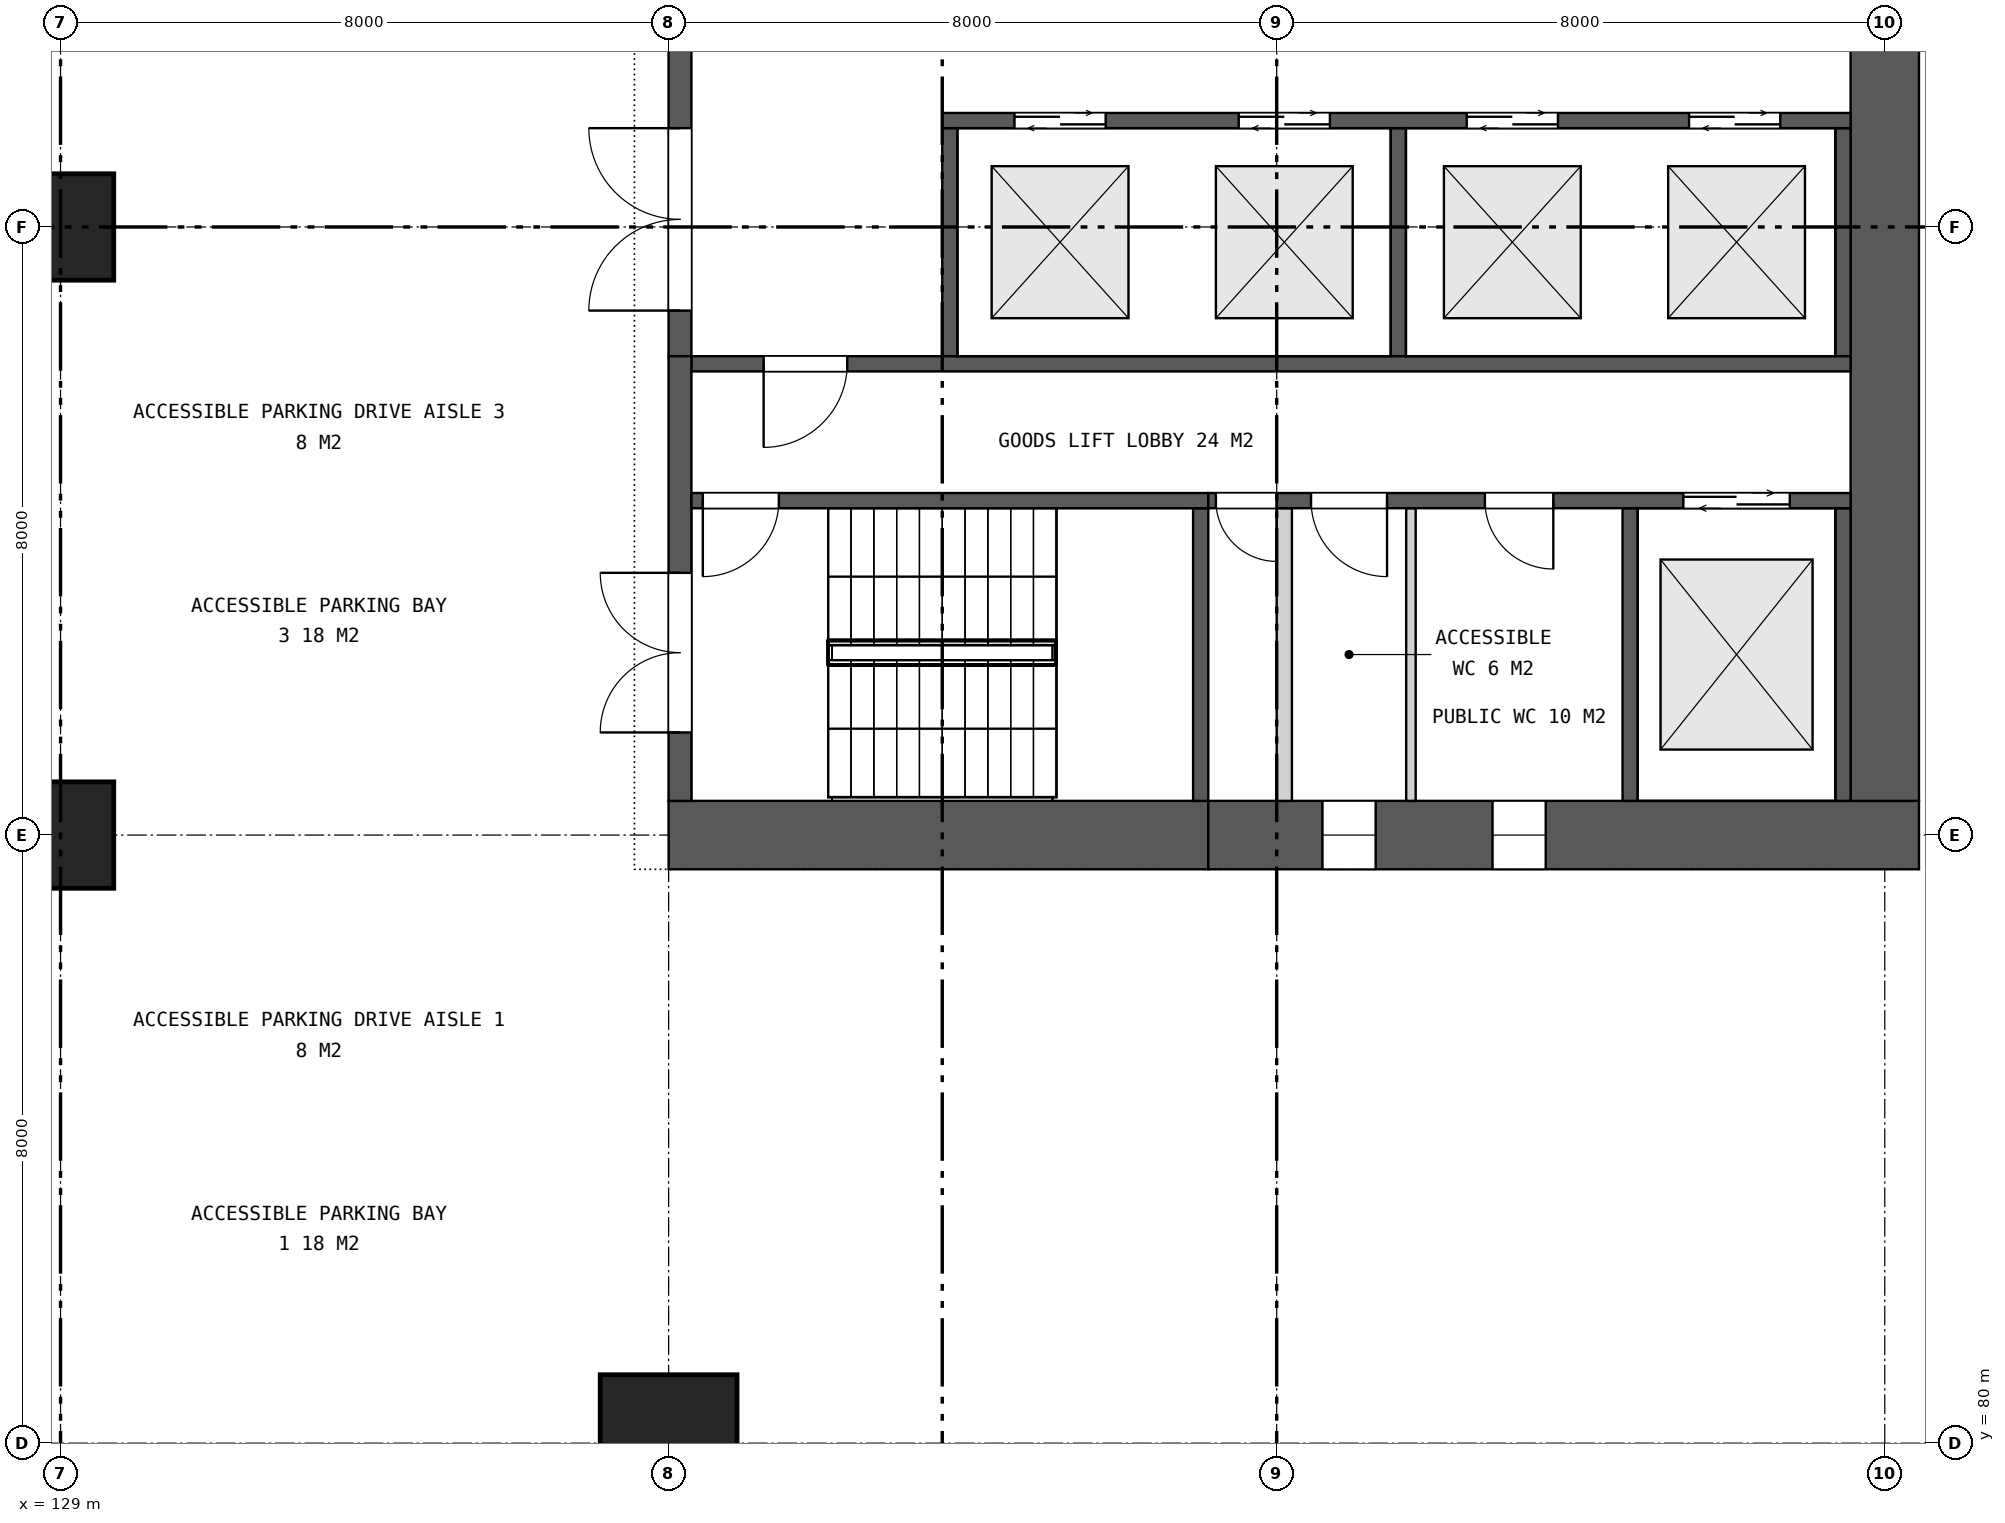
"""IFC4 building model, lengths in metres.
Left out: names, types, materials, properties, quantities, classifications, styles, units other than length and angle.
Written with IfcOpenShell. Run it as: python <this file> out.ifc"""

import sys

from ifc_helpers import new_model, si_unit, direction, frame, frame_2d, origin, origin_2d, place, context, subcontext, project, spatial, rectangle, circle, extrude, element, fill, save


model = new_model("IFC4")
c1 = context("Model", 3, precision=1e-05, world=origin(), true_north=direction((0.0, 1.0)))
c2 = subcontext(c1, "Body", "Model", "MODEL_VIEW")
j1 = project(units=[si_unit("LENGTHUNIT", "METRE"), si_unit("PLANEANGLEUNIT", "RADIAN")], contexts=[c1])
p1 = place(None, origin())
s1 = spatial("IfcSite", under=j1, at=p1, CompositionType="ELEMENT")
p2 = place(p1, origin())
s2 = spatial("IfcBuilding", under=s1, at=p2, CompositionType="ELEMENT")
p3 = place(p2, origin())
s3 = spatial("IfcBuildingStorey", under=s2, at=p3, CompositionType="ELEMENT", Elevation=0.0)
for number, where, z_axis, x_axis in (
    (1, (129.0, 88.0, -0.4), (0.0, 0.0, 1.0), (1.0, 0.0, 0.0)),
    (2, (129.0, 96.0, -0.4), (0.0, 0.0, 1.0), (1.0, 0.0, 0.0)),
):
    element("IfcColumn", number, at=place(p3, frame(where, z_axis=z_axis, x_axis=x_axis)), inside=s3, PredefinedType="COLUMN", context=c2, shape_type="SweptSolid", body=[
        extrude(circle(Radius=0.7, at=origin_2d()), origin(), (0.0, 0.0, 1.0), 10.4),
    ])
p4 = place(p3, frame((137.0, 80.0, -0.4), z_axis=(0.0, 0.0, 1.0), x_axis=(1.0, 0.0, 0.0)))
e3 = element("IfcColumn", 3, at=p4, inside=s3, PredefinedType="COLUMN", context=c2, shape_type="SweptSolid", body=[
    extrude(circle(Radius=0.9, at=origin_2d()), origin(), (0.0, 0.0, 1.0), 10.4),
])
p5 = place(p3, frame((137.0, 88.0, 0.0), z_axis=(0.0, 0.0, 1.0), x_axis=(1.0, 0.0, 0.0)))
e4 = element("IfcWall", 4, at=p5, inside=s3, PredefinedType="SHEAR", context=c2, shape_type="SweptSolid", body=[
    extrude(rectangle(XDim=7.1, YDim=0.9, at=frame_2d((3.55, 0.0))), origin(), (0.0, 0.0, 1.0), 10.0),
])
p6 = place(p3, frame((144.1, 88.0, 0.0), z_axis=(0.0, 0.0, 1.0), x_axis=(1.0, 0.0, 0.0)))
e5 = element("IfcWall", 5, at=p6, inside=s3, PredefinedType="SHEAR", context=c2, shape_type="SweptSolid", body=[
    extrude(rectangle(XDim=9.35, YDim=0.9, at=frame_2d((4.675, 0.0))), origin(), (0.0, 0.0, 1.0), 10.0),
])
p7 = place(p6, frame((1.502, 0.0, 1.5)))
e6 = element("IfcOpeningElement", 6, at=p7, cuts=e5, PredefinedType="OPENING", context=c2, shape_type="SweptSolid", body=[
    extrude(rectangle(XDim=0.7, YDim=0.9, at=frame_2d((0.35, 0.45))), frame((0.0, 0.46, 0.0), z_axis=(0.0, -1.0, 0.0), x_axis=(1.0, 0.0, 0.0)), (0.0, 0.0, 1.0), 0.92),
])
p8 = place(p6, frame((3.739, 0.0, 1.5)))
e7 = element("IfcOpeningElement", 7, at=p8, cuts=e5, PredefinedType="OPENING", context=c2, shape_type="SweptSolid", body=[
    extrude(rectangle(XDim=0.7, YDim=0.9, at=frame_2d((0.35, 0.45))), frame((0.0, 0.46, 0.0), z_axis=(0.0, -1.0, 0.0), x_axis=(1.0, 0.0, 0.0)), (0.0, 0.0, 1.0), 0.92),
])
p9 = place(p3, frame((153.0, 88.45, 0.0), z_axis=(0.0, 0.0, 1.0), x_axis=(0.0, 1.0, 0.0)))
e8 = element("IfcWall", 8, at=p9, inside=s3, PredefinedType="SHEAR", context=c2, shape_type="SweptSolid", body=[
    extrude(rectangle(XDim=23.1, YDim=0.9, at=frame_2d((11.55, 0.0))), origin(), (0.0, 0.0, 1.0), 10.0),
])
p10 = place(p9, frame((10.35, 0.0, 0.0)))
e9 = element("IfcOpeningElement", 9, at=p10, cuts=e8, PredefinedType="OPENING", context=c2, shape_type="SweptSolid", body=[
    extrude(rectangle(XDim=2.4, YDim=2.4, at=frame_2d((1.2, 1.2))), frame((0.0, 0.46, 0.0), z_axis=(0.0, -1.0, 0.0), x_axis=(1.0, 0.0, 0.0)), (0.0, 0.0, 1.0), 0.92),
])
p11 = place(p3, frame((137.15, 94.3, 0.0), z_axis=(0.0, 0.0, 1.0), x_axis=(0.0, 1.0, 0.0)))
e10 = element("IfcWall", 10, at=p11, inside=s3, PredefinedType="SHEAR", context=c2, shape_type="SweptSolid", body=[
    extrude(rectangle(XDim=11.4, YDim=0.3, at=frame_2d((5.7, 0.0))), origin(), (0.0, 0.0, 1.0), 10.0),
])
p12 = place(p11, frame((0.6, 0.0, 0.0)))
e11 = element("IfcOpeningElement", 11, at=p12, cuts=e10, PredefinedType="OPENING", context=c2, shape_type="SweptSolid", body=[
    extrude(rectangle(XDim=2.4, YDim=2.4, at=frame_2d((1.2, 1.2))), frame((0.0, 0.16, 0.0), z_axis=(0.0, -1.0, 0.0), x_axis=(1.0, 0.0, 0.0)), (0.0, 0.0, 1.0), 0.32),
])
p13 = place(p11, frame((4.5, 0.0, 0.0)))
e12 = element("IfcOpeningElement", 12, at=p13, cuts=e10, PredefinedType="OPENING", context=c2, shape_type="SweptSolid", body=[
    extrude(rectangle(XDim=2.4, YDim=2.4, at=frame_2d((1.2, 1.2))), frame((0.0, 0.16, 0.0), z_axis=(0.0, -1.0, 0.0), x_axis=(1.0, 0.0, 0.0)), (0.0, 0.0, 1.0), 0.32),
])
p14 = place(p11, frame((8.4, 0.0, 0.0)))
e13 = element("IfcOpeningElement", 13, at=p14, cuts=e10, PredefinedType="OPENING", context=c2, shape_type="SweptSolid", body=[
    extrude(rectangle(XDim=2.4, YDim=2.4, at=frame_2d((1.2, 1.2))), frame((0.0, 0.16, 0.0), z_axis=(0.0, -1.0, 0.0), x_axis=(1.0, 0.0, 0.0)), (0.0, 0.0, 1.0), 0.32),
])
for number, where, z_axis, x_axis in (
    (14, (140.7, 94.3, 0.0), (0.0, 0.0, 1.0), (0.0, 1.0, 0.0)),
    (15, (146.6, 94.3, 0.0), (0.0, 0.0, 1.0), (0.0, 1.0, 0.0)),
    (16, (152.45, 94.3, 0.0), (0.0, 0.0, 1.0), (0.0, 1.0, 0.0)),
):
    element("IfcWall", number, at=place(p3, frame(where, z_axis=z_axis, x_axis=x_axis)), inside=s3, PredefinedType="SHEAR", context=c2, shape_type="SweptSolid", body=[
        extrude(rectangle(XDim=3.0, YDim=0.2, at=frame_2d((1.5, 0.0))), origin(), (0.0, 0.0, 1.0), 10.0),
    ])
p15 = place(p3, frame((140.6, 97.4, 0.0), z_axis=(0.0, 0.0, 1.0), x_axis=(1.0, 0.0, 0.0)))
e17 = element("IfcWall", 17, at=p15, inside=s3, PredefinedType="SHEAR", context=c2, shape_type="SweptSolid", body=[
    extrude(rectangle(XDim=11.95, YDim=0.2, at=frame_2d((5.975, 0.0))), origin(), (0.0, 0.0, 1.0), 10.0),
])
p16 = place(p15, frame((0.95, 0.0, 0.0)))
e18 = element("IfcOpeningElement", 18, at=p16, cuts=e17, PredefinedType="OPENING", context=c2, shape_type="SweptSolid", body=[
    extrude(rectangle(XDim=1.2, YDim=2.1, at=frame_2d((0.6, 1.05))), frame((0.0, 0.11, 0.0), z_axis=(0.0, -1.0, 0.0), x_axis=(1.0, 0.0, 0.0)), (0.0, 0.0, 1.0), 0.22),
])
p17 = place(p15, frame((3.9, 0.0, 0.0)))
e19 = element("IfcOpeningElement", 19, at=p17, cuts=e17, PredefinedType="OPENING", context=c2, shape_type="SweptSolid", body=[
    extrude(rectangle(XDim=1.2, YDim=2.1, at=frame_2d((0.6, 1.05))), frame((0.0, 0.11, 0.0), z_axis=(0.0, -1.0, 0.0), x_axis=(1.0, 0.0, 0.0)), (0.0, 0.0, 1.0), 0.22),
])
p18 = place(p15, frame((6.9, 0.0, 0.0)))
e20 = element("IfcOpeningElement", 20, at=p18, cuts=e17, PredefinedType="OPENING", context=c2, shape_type="SweptSolid", body=[
    extrude(rectangle(XDim=1.2, YDim=2.1, at=frame_2d((0.6, 1.05))), frame((0.0, 0.11, 0.0), z_axis=(0.0, -1.0, 0.0), x_axis=(1.0, 0.0, 0.0)), (0.0, 0.0, 1.0), 0.22),
])
p19 = place(p15, frame((9.825, 0.0, 0.0)))
e21 = element("IfcOpeningElement", 21, at=p19, cuts=e17, PredefinedType="OPENING", context=c2, shape_type="SweptSolid", body=[
    extrude(rectangle(XDim=1.2, YDim=2.1, at=frame_2d((0.6, 1.05))), frame((0.0, 0.11, 0.0), z_axis=(0.0, -1.0, 0.0), x_axis=(1.0, 0.0, 0.0)), (0.0, 0.0, 1.0), 0.22),
])
p20 = place(p3, frame((137.3, 94.2, 0.0), z_axis=(0.0, 0.0, 1.0), x_axis=(1.0, 0.0, 0.0)))
e22 = element("IfcWall", 22, at=p20, inside=s3, PredefinedType="SHEAR", context=c2, shape_type="SweptSolid", body=[
    extrude(rectangle(XDim=15.25, YDim=0.2, at=frame_2d((7.625, 0.0))), origin(), (0.0, 0.0, 1.0), 10.0),
])
p21 = place(p20, frame((0.95, 0.0, 0.0)))
e23 = element("IfcOpeningElement", 23, at=p21, cuts=e22, PredefinedType="OPENING", context=c2, shape_type="SweptSolid", body=[
    extrude(rectangle(XDim=1.1, YDim=2.1, at=frame_2d((0.55, 1.05))), frame((0.0, 0.11, 0.0), z_axis=(0.0, -1.0, 0.0), x_axis=(1.0, 0.0, 0.0)), (0.0, 0.0, 1.0), 0.22),
])
p22 = place(p3, frame((137.15, 88.45, 0.0), z_axis=(0.0, 0.0, 1.0), x_axis=(0.0, 1.0, 0.0)))
e24 = element("IfcWall", 24, at=p22, inside=s3, PredefinedType="SHEAR", context=c2, shape_type="SweptSolid", body=[
    extrude(rectangle(XDim=5.85, YDim=0.3, at=frame_2d((2.925, 0.0))), origin(), (0.0, 0.0, 1.0), 10.0),
])
p23 = place(p22, frame((0.9, 0.0, 0.0)))
e25 = element("IfcOpeningElement", 25, at=p23, cuts=e24, PredefinedType="OPENING", context=c2, shape_type="SweptSolid", body=[
    extrude(rectangle(XDim=2.1, YDim=2.4, at=frame_2d((1.05, 1.2))), frame((0.0, 0.16, 0.0), z_axis=(0.0, -1.0, 0.0), x_axis=(1.0, 0.0, 0.0)), (0.0, 0.0, 1.0), 0.32),
])
for number, where, z_axis, x_axis in (
    (26, (144.0, 88.45, 0.0), (0.0, 0.0, 1.0), (0.0, 1.0, 0.0)),
    (27, (149.65, 88.45, 0.0), (0.0, 0.0, 1.0), (0.0, 1.0, 0.0)),
    (28, (152.45, 88.45, 0.0), (0.0, 0.0, 1.0), (0.0, 1.0, 0.0)),
):
    element("IfcWall", number, at=place(p3, frame(where, z_axis=z_axis, x_axis=x_axis)), inside=s3, PredefinedType="SHEAR", context=c2, shape_type="SweptSolid", body=[
        extrude(rectangle(XDim=3.85, YDim=0.2, at=frame_2d((1.925, 0.0))), origin(), (0.0, 0.0, 1.0), 10.0),
    ])
p24 = place(p3, frame((145.1, 88.45, 0.0), z_axis=(0.0, 0.0, 1.0), x_axis=(0.0, 1.0, 0.0)))
e29 = element("IfcWall", 29, at=p24, inside=s3, PredefinedType="PARTITIONING", context=c2, shape_type="SweptSolid", body=[
    extrude(rectangle(XDim=3.85, YDim=0.2, at=frame_2d((1.925, 0.0))), origin(), (0.0, 0.0, 1.0), 10.0),
])
p25 = place(p3, frame((146.766, 88.45, 0.0), z_axis=(0.0, 0.0, 1.0), x_axis=(0.0, 1.0, 0.0)))
e30 = element("IfcWall", 30, at=p25, inside=s3, PredefinedType="PARTITIONING", context=c2, shape_type="SweptSolid", body=[
    extrude(rectangle(XDim=3.85, YDim=0.125, at=frame_2d((1.925, 0.0))), origin(), (0.0, 0.0, 1.0), 10.0),
])
p26 = place(p3, frame((137.3, 92.4, 0.0), z_axis=(0.0, 0.0, 1.0), x_axis=(1.0, 0.0, 0.0)))
e31 = element("IfcWall", 31, at=p26, inside=s3, PredefinedType="SHEAR", context=c2, shape_type="SweptSolid", body=[
    extrude(rectangle(XDim=6.8, YDim=0.2, at=frame_2d((3.4, 0.0))), origin(), (0.0, 0.0, 1.0), 10.0),
])
p27 = place(p26, frame((0.15, 0.0, 0.0)))
e32 = element("IfcOpeningElement", 32, at=p27, cuts=e31, PredefinedType="OPENING", context=c2, shape_type="SweptSolid", body=[
    extrude(rectangle(XDim=1.0, YDim=2.1, at=frame_2d((0.5, 1.05))), frame((0.0, 0.11, 0.0), z_axis=(0.0, -1.0, 0.0), x_axis=(1.0, 0.0, 0.0)), (0.0, 0.0, 1.0), 0.22),
])
p28 = place(p3, frame((144.1, 92.4, 0.0), z_axis=(0.0, 0.0, 1.0), x_axis=(1.0, 0.0, 0.0)))
e33 = element("IfcWall", 33, at=p28, inside=s3, PredefinedType="SHEAR", context=c2, shape_type="SweptSolid", body=[
    extrude(rectangle(XDim=8.45, YDim=0.2, at=frame_2d((4.225, 0.0))), origin(), (0.0, 0.0, 1.0), 10.0),
])
p29 = place(p28, frame((0.1, 0.0, 0.0)))
e34 = element("IfcOpeningElement", 34, at=p29, cuts=e33, PredefinedType="OPENING", context=c2, shape_type="SweptSolid", body=[
    extrude(rectangle(XDim=0.8, YDim=2.1, at=frame_2d((0.4, 1.05))), frame((0.0, 0.11, 0.0), z_axis=(0.0, -1.0, 0.0), x_axis=(1.0, 0.0, 0.0)), (0.0, 0.0, 1.0), 0.22),
])
p30 = place(p28, frame((1.352, 0.0, 0.0)))
e35 = element("IfcOpeningElement", 35, at=p30, cuts=e33, PredefinedType="OPENING", context=c2, shape_type="SweptSolid", body=[
    extrude(rectangle(XDim=1.0, YDim=2.1, at=frame_2d((0.5, 1.05))), frame((0.0, 0.11, 0.0), z_axis=(0.0, -1.0, 0.0), x_axis=(1.0, 0.0, 0.0)), (0.0, 0.0, 1.0), 0.22),
])
p31 = place(p28, frame((3.639, 0.0, 0.0)))
e36 = element("IfcOpeningElement", 36, at=p31, cuts=e33, PredefinedType="OPENING", context=c2, shape_type="SweptSolid", body=[
    extrude(rectangle(XDim=0.9, YDim=2.1, at=frame_2d((0.45, 1.05))), frame((0.0, 0.11, 0.0), z_axis=(0.0, -1.0, 0.0), x_axis=(1.0, 0.0, 0.0)), (0.0, 0.0, 1.0), 0.22),
])
p32 = place(p28, frame((6.25, 0.0, 0.0)))
e37 = element("IfcOpeningElement", 37, at=p32, cuts=e33, PredefinedType="OPENING", context=c2, shape_type="SweptSolid", body=[
    extrude(rectangle(XDim=1.4, YDim=2.1, at=frame_2d((0.7, 1.05))), frame((0.0, 0.11, 0.0), z_axis=(0.0, -1.0, 0.0), x_axis=(1.0, 0.0, 0.0)), (0.0, 0.0, 1.0), 0.22),
])
p33 = place(p7, origin())
e38 = element("IfcWindow", 38, at=p33, inside=s3, PartitioningType="SINGLE_PANEL", PredefinedType="WINDOW", context=c2, shape_type="SweptSolid", body=[
    extrude(rectangle(XDim=0.7, YDim=0.9, at=frame_2d((0.35, 0.45))), frame((0.0, 0.03, 0.0), z_axis=(0.0, -1.0, 0.0), x_axis=(1.0, 0.0, 0.0)), (0.0, 0.0, 1.0), 0.06),
])
fill(e6, e38)
p34 = place(p8, origin())
e39 = element("IfcWindow", 39, at=p34, inside=s3, PartitioningType="SINGLE_PANEL", PredefinedType="WINDOW", context=c2, shape_type="SweptSolid", body=[
    extrude(rectangle(XDim=0.7, YDim=0.9, at=frame_2d((0.35, 0.45))), frame((0.0, 0.03, 0.0), z_axis=(0.0, -1.0, 0.0), x_axis=(1.0, 0.0, 0.0)), (0.0, 0.0, 1.0), 0.06),
])
fill(e7, e39)
p35 = place(p12, origin())
e40 = element("IfcDoor", 40, at=p35, inside=s3, OperationType="DOUBLE_DOOR_SINGLE_SWING", PredefinedType="DOOR", context=c2, shape_type="SweptSolid", body=[
    extrude(rectangle(XDim=2.4, YDim=2.4, at=frame_2d((1.2, 1.2))), frame((0.0, 0.025, 0.0), z_axis=(0.0, -1.0, 0.0), x_axis=(1.0, 0.0, 0.0)), (0.0, 0.0, 1.0), 0.05),
])
fill(e11, e40)
p36 = place(p16, origin())
e41 = element("IfcDoor", 41, at=p36, inside=s3, OperationType="DOUBLE_DOOR_SLIDING", PredefinedType="DOOR", context=c2, shape_type="SweptSolid", body=[
    extrude(rectangle(XDim=1.2, YDim=2.1, at=frame_2d((0.6, 1.05))), frame((0.0, 0.025, 0.0), z_axis=(0.0, -1.0, 0.0), x_axis=(1.0, 0.0, 0.0)), (0.0, 0.0, 1.0), 0.05),
])
fill(e18, e41)
p37 = place(p17, origin())
e42 = element("IfcDoor", 42, at=p37, inside=s3, OperationType="DOUBLE_DOOR_SLIDING", PredefinedType="DOOR", context=c2, shape_type="SweptSolid", body=[
    extrude(rectangle(XDim=1.2, YDim=2.1, at=frame_2d((0.6, 1.05))), frame((0.0, 0.025, 0.0), z_axis=(0.0, -1.0, 0.0), x_axis=(1.0, 0.0, 0.0)), (0.0, 0.0, 1.0), 0.05),
])
fill(e19, e42)
p38 = place(p18, origin())
e43 = element("IfcDoor", 43, at=p38, inside=s3, OperationType="DOUBLE_DOOR_SLIDING", PredefinedType="DOOR", context=c2, shape_type="SweptSolid", body=[
    extrude(rectangle(XDim=1.2, YDim=2.1, at=frame_2d((0.6, 1.05))), frame((0.0, 0.025, 0.0), z_axis=(0.0, -1.0, 0.0), x_axis=(1.0, 0.0, 0.0)), (0.0, 0.0, 1.0), 0.05),
])
fill(e20, e43)
p39 = place(p19, origin())
e44 = element("IfcDoor", 44, at=p39, inside=s3, OperationType="DOUBLE_DOOR_SLIDING", PredefinedType="DOOR", context=c2, shape_type="SweptSolid", body=[
    extrude(rectangle(XDim=1.2, YDim=2.1, at=frame_2d((0.6, 1.05))), frame((0.0, 0.025, 0.0), z_axis=(0.0, -1.0, 0.0), x_axis=(1.0, 0.0, 0.0)), (0.0, 0.0, 1.0), 0.05),
])
fill(e21, e44)
p40 = place(p21, frame((1.1, 0.0, 0.0), z_axis=(0.0, 0.0, 1.0), x_axis=(-1.0, 0.0, 0.0)))
e45 = element("IfcDoor", 45, at=p40, inside=s3, OperationType="SINGLE_SWING_RIGHT", PredefinedType="DOOR", context=c2, shape_type="SweptSolid", body=[
    extrude(rectangle(XDim=1.1, YDim=2.1, at=frame_2d((0.55, 1.05))), frame((0.0, 0.025, 0.0), z_axis=(0.0, -1.0, 0.0), x_axis=(1.0, 0.0, 0.0)), (0.0, 0.0, 1.0), 0.05),
])
fill(e23, e45)
p41 = place(p23, origin())
e46 = element("IfcDoor", 46, at=p41, inside=s3, OperationType="DOUBLE_DOOR_SINGLE_SWING", PredefinedType="DOOR", context=c2, shape_type="SweptSolid", body=[
    extrude(rectangle(XDim=2.1, YDim=2.4, at=frame_2d((1.05, 1.2))), frame((0.0, 0.025, 0.0), z_axis=(0.0, -1.0, 0.0), x_axis=(1.0, 0.0, 0.0)), (0.0, 0.0, 1.0), 0.05),
])
fill(e25, e46)
p42 = place(p27, frame((1.0, 0.0, 0.0), z_axis=(0.0, 0.0, 1.0), x_axis=(-1.0, 0.0, 0.0)))
e47 = element("IfcDoor", 47, at=p42, inside=s3, OperationType="SINGLE_SWING_RIGHT", PredefinedType="DOOR", context=c2, shape_type="SweptSolid", body=[
    extrude(rectangle(XDim=1.0, YDim=2.1, at=frame_2d((0.5, 1.05))), frame((0.0, 0.025, 0.0), z_axis=(0.0, -1.0, 0.0), x_axis=(1.0, 0.0, 0.0)), (0.0, 0.0, 1.0), 0.05),
])
fill(e32, e47)
p43 = place(p29, frame((0.8, 0.0, 0.0), z_axis=(0.0, 0.0, 1.0), x_axis=(-1.0, 0.0, 0.0)))
e48 = element("IfcDoor", 48, at=p43, inside=s3, OperationType="SINGLE_SWING_LEFT", PredefinedType="DOOR", context=c2, shape_type="SweptSolid", body=[
    extrude(rectangle(XDim=0.8, YDim=2.1, at=frame_2d((0.4, 1.05))), frame((0.0, 0.025, 0.0), z_axis=(0.0, -1.0, 0.0), x_axis=(1.0, 0.0, 0.0)), (0.0, 0.0, 1.0), 0.05),
])
fill(e34, e48)
p44 = place(p30, frame((1.0, 0.0, 0.0), z_axis=(0.0, 0.0, 1.0), x_axis=(-1.0, 0.0, 0.0)))
e49 = element("IfcDoor", 49, at=p44, inside=s3, OperationType="SINGLE_SWING_LEFT", PredefinedType="DOOR", context=c2, shape_type="SweptSolid", body=[
    extrude(rectangle(XDim=1.0, YDim=2.1, at=frame_2d((0.5, 1.05))), frame((0.0, 0.025, 0.0), z_axis=(0.0, -1.0, 0.0), x_axis=(1.0, 0.0, 0.0)), (0.0, 0.0, 1.0), 0.05),
])
fill(e35, e49)
p45 = place(p31, frame((0.9, 0.0, 0.0), z_axis=(0.0, 0.0, 1.0), x_axis=(-1.0, 0.0, 0.0)))
e50 = element("IfcDoor", 50, at=p45, inside=s3, OperationType="SINGLE_SWING_LEFT", PredefinedType="DOOR", context=c2, shape_type="SweptSolid", body=[
    extrude(rectangle(XDim=0.9, YDim=2.1, at=frame_2d((0.45, 1.05))), frame((0.0, 0.025, 0.0), z_axis=(0.0, -1.0, 0.0), x_axis=(1.0, 0.0, 0.0)), (0.0, 0.0, 1.0), 0.05),
])
fill(e36, e50)
p46 = place(p32, origin())
e51 = element("IfcDoor", 51, at=p46, inside=s3, OperationType="DOUBLE_DOOR_SLIDING", PredefinedType="DOOR", context=c2, shape_type="SweptSolid", body=[
    extrude(rectangle(XDim=1.4, YDim=2.1, at=frame_2d((0.7, 1.05))), frame((0.0, 0.025, 0.0), z_axis=(0.0, -1.0, 0.0), x_axis=(1.0, 0.0, 0.0)), (0.0, 0.0, 1.0), 0.05),
])
fill(e37, e51)
save(model, sys.argv[1])
